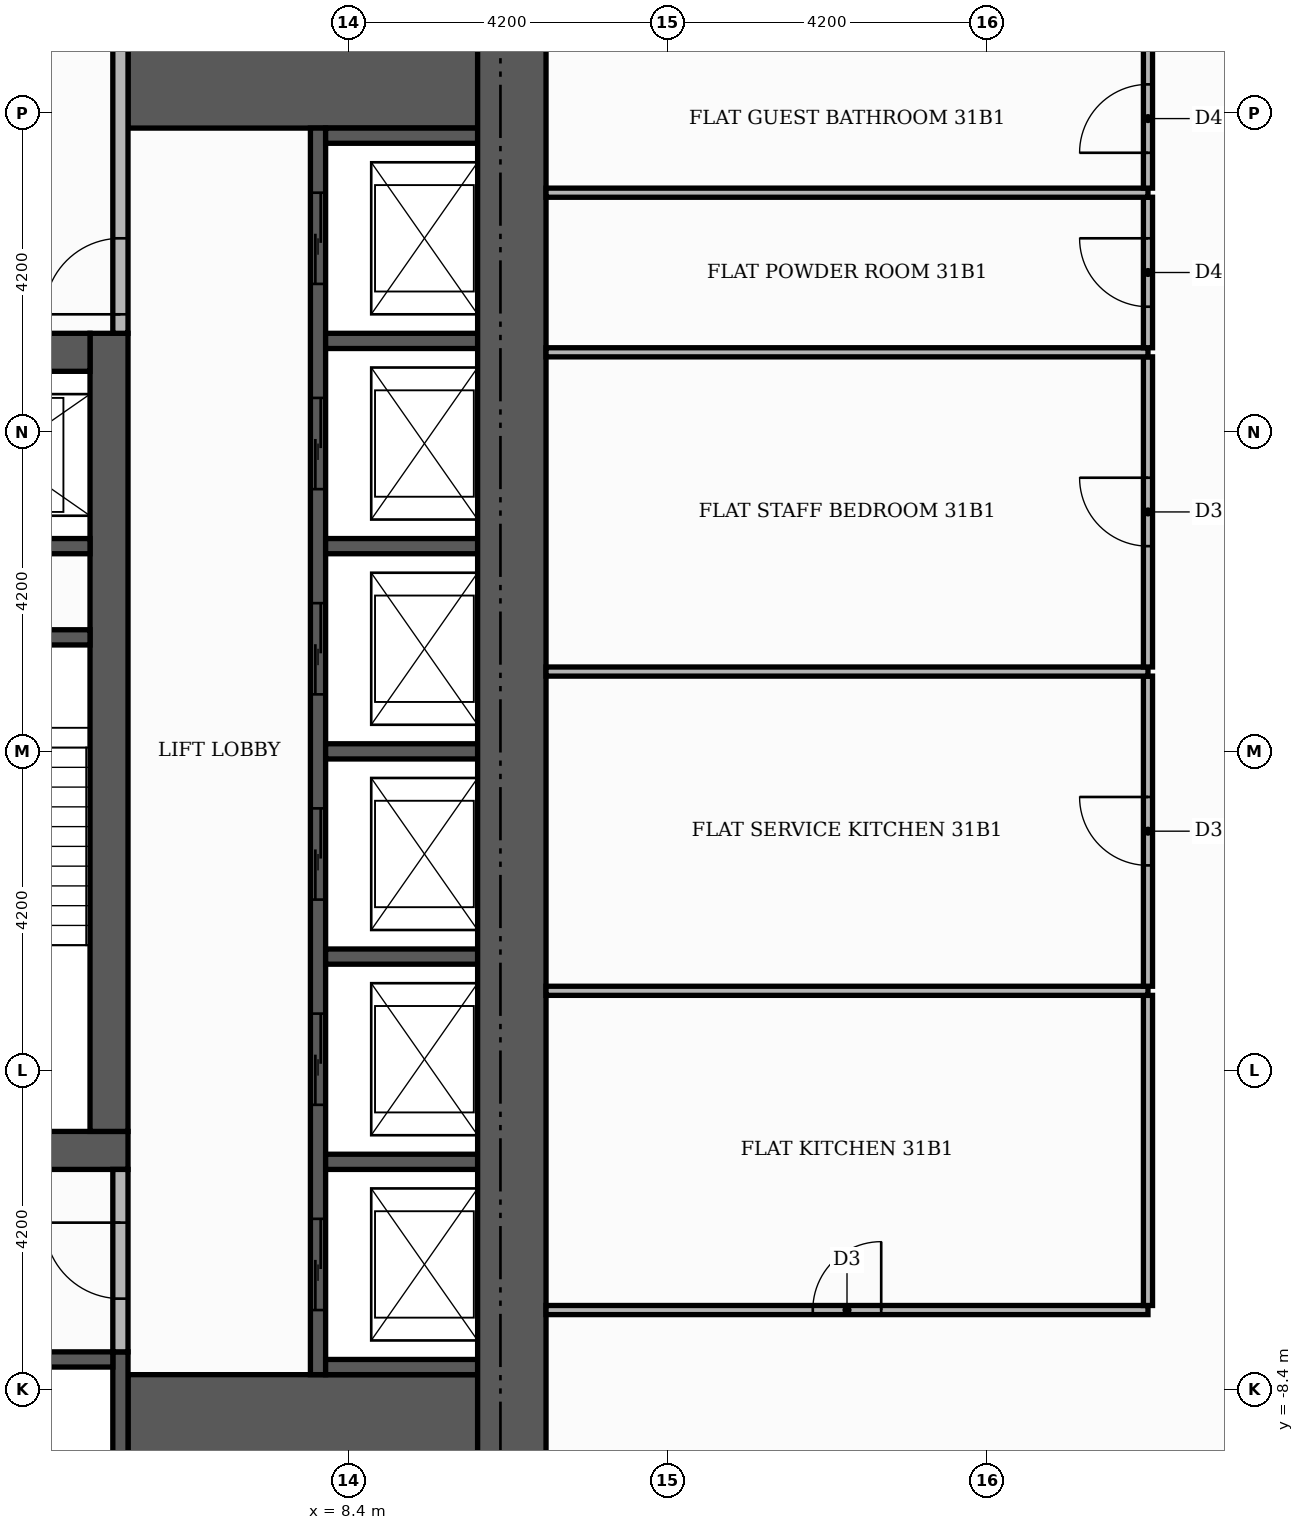
"""IFC4 building model, lengths in metres.
Left out: names, types, materials, properties, quantities, classifications, styles, units other than length and angle.
Written with IfcOpenShell. Run it as: python <this file> out.ifc"""

import sys

from ifc_helpers import new_model, si_unit, direction, frame, frame_2d, origin, place, context, subcontext, project, spatial, rectangle, extrude, element, fill, save


model = new_model("IFC4")
c1 = context("Model", 3, precision=1e-05, world=origin(), true_north=direction((0.0, 1.0)))
c2 = subcontext(c1, "Body", "Model", "MODEL_VIEW")
j1 = project(units=[si_unit("LENGTHUNIT", "METRE"), si_unit("PLANEANGLEUNIT", "RADIAN")], contexts=[c1])
p1 = place(None, origin())
s1 = spatial("IfcSite", under=j1, at=p1, CompositionType="ELEMENT")
p2 = place(p1, origin())
s2 = spatial("IfcBuilding", under=s1, at=p2, CompositionType="ELEMENT")
p3 = place(p2, frame((0.0, 0.0, 133.8)))
s3 = spatial("IfcBuildingStorey", under=s2, at=p3, CompositionType="ELEMENT", Elevation=133.8)
p4 = place(p3, frame((-5.5, -5.25, 0.0), z_axis=(0.0, 0.0, 1.0), x_axis=(1.0, 0.0, 0.0)))
e1 = element("IfcWall", 1, at=p4, inside=s3, PredefinedType="SHEAR", context=c2, shape_type="SweptSolid", body=[
    extrude(rectangle(XDim=11.0, YDim=0.5, at=frame_2d((5.5, 0.0))), origin(), (0.0, 0.0, 1.0), 3.48),
])
p5 = place(p4, frame((4.9, 0.0, 0.0)))
e2 = element("IfcOpeningElement", 2, at=p5, cuts=e1, PredefinedType="OPENING", context=c2, shape_type="SweptSolid", body=[
    extrude(rectangle(XDim=1.2, YDim=2.1, at=frame_2d((0.6, 1.05))), frame((0.0, 0.26, 0.0), z_axis=(0.0, -1.0, 0.0), x_axis=(1.0, 0.0, 0.0)), (0.0, 0.0, 1.0), 0.52),
])
p6 = place(p3, frame((5.25, -5.0, 0.0), z_axis=(0.0, 0.0, 1.0), x_axis=(0.0, 1.0, 0.0)))
e3 = element("IfcWall", 3, at=p6, inside=s3, PredefinedType="SHEAR", context=c2, shape_type="SweptSolid", body=[
    extrude(rectangle(XDim=10.5, YDim=0.5, at=frame_2d((5.25, 0.0))), origin(), (0.0, 0.0, 1.0), 3.48),
])
p7 = place(p3, frame((-5.0, 5.25, 0.0), z_axis=(0.0, 0.0, 1.0), x_axis=(1.0, 0.0, 0.0)))
e4 = element("IfcWall", 4, at=p7, inside=s3, PredefinedType="SHEAR", context=c2, shape_type="SweptSolid", body=[
    extrude(rectangle(XDim=10.0, YDim=0.5, at=frame_2d((5.0, 0.0))), origin(), (0.0, 0.0, 1.0), 3.48),
])
p8 = place(p7, frame((4.4, 0.0, 0.0)))
e5 = element("IfcOpeningElement", 5, at=p8, cuts=e4, PredefinedType="OPENING", context=c2, shape_type="SweptSolid", body=[
    extrude(rectangle(XDim=1.2, YDim=2.1, at=frame_2d((0.6, 1.05))), frame((0.0, 0.26, 0.0), z_axis=(0.0, -1.0, 0.0), x_axis=(1.0, 0.0, 0.0)), (0.0, 0.0, 1.0), 0.52),
])
for number, where, z_axis, x_axis in (
    (6, (5.5, -9.15, 0.0), (0.0, 0.0, 1.0), (1.0, 0.0, 0.0)),
    (7, (5.5, 9.15, 0.0), (0.0, 0.0, 1.0), (1.0, 0.0, 0.0)),
):
    element("IfcWall", number, at=place(p3, frame(where, z_axis=z_axis, x_axis=x_axis)), inside=s3, PredefinedType="SHEAR", context=c2, shape_type="SweptSolid", body=[
        extrude(rectangle(XDim=4.6, YDim=1.9, at=frame_2d((2.3, 0.0))), origin(), (0.0, 0.0, 1.0), 3.48),
    ])
p9 = place(p3, frame((2.15, 1.5, 0.0), z_axis=(0.0, 0.0, 1.0), x_axis=(1.0, 0.0, 0.0)))
e8 = element("IfcWall", 8, at=p9, inside=s3, PredefinedType="SHEAR", context=c2, shape_type="SweptSolid", body=[
    extrude(rectangle(XDim=2.85, YDim=0.2, at=frame_2d((1.425, 0.0))), origin(), (0.0, 0.0, 1.0), 3.48),
])
p10 = place(p3, frame((5.4, -10.1, 0.0), z_axis=(0.0, 0.0, 1.0), x_axis=(0.0, 1.0, 0.0)))
e9 = element("IfcWall", 9, at=p10, inside=s3, PredefinedType="SHEAR", context=c2, shape_type="SweptSolid", body=[
    extrude(rectangle(XDim=2.2, YDim=0.2, at=frame_2d((1.1, 0.0))), origin(), (0.0, 0.0, 1.0), 3.48),
])
p11 = place(p3, frame((8.0, -8.2, 0.0), z_axis=(0.0, 0.0, 1.0), x_axis=(0.0, 1.0, 0.0)))
e10 = element("IfcWall", 10, at=p11, inside=s3, PredefinedType="SHEAR", context=c2, shape_type="SweptSolid", body=[
    extrude(rectangle(XDim=16.4, YDim=0.2, at=frame_2d((8.2, 0.0))), origin(), (0.0, 0.0, 1.0), 3.48),
])
p12 = place(p11, frame((0.85, 0.0, 0.0)))
e11 = element("IfcOpeningElement", 11, at=p12, cuts=e10, PredefinedType="OPENING", context=c2, shape_type="SweptSolid", body=[
    extrude(rectangle(XDim=1.2, YDim=2.1, at=frame_2d((0.6, 1.05))), frame((0.0, 0.11, 0.0), z_axis=(0.0, -1.0, 0.0), x_axis=(1.0, 0.0, 0.0)), (0.0, 0.0, 1.0), 0.22),
])
p13 = place(p11, frame((3.55, 0.0, 0.0)))
e12 = element("IfcOpeningElement", 12, at=p13, cuts=e10, PredefinedType="OPENING", context=c2, shape_type="SweptSolid", body=[
    extrude(rectangle(XDim=1.2, YDim=2.1, at=frame_2d((0.6, 1.05))), frame((0.0, 0.11, 0.0), z_axis=(0.0, -1.0, 0.0), x_axis=(1.0, 0.0, 0.0)), (0.0, 0.0, 1.0), 0.22),
])
p14 = place(p11, frame((6.25, 0.0, 0.0)))
e13 = element("IfcOpeningElement", 13, at=p14, cuts=e10, PredefinedType="OPENING", context=c2, shape_type="SweptSolid", body=[
    extrude(rectangle(XDim=1.2, YDim=2.1, at=frame_2d((0.6, 1.05))), frame((0.0, 0.11, 0.0), z_axis=(0.0, -1.0, 0.0), x_axis=(1.0, 0.0, 0.0)), (0.0, 0.0, 1.0), 0.22),
])
p15 = place(p11, frame((8.95, 0.0, 0.0)))
e14 = element("IfcOpeningElement", 14, at=p15, cuts=e10, PredefinedType="OPENING", context=c2, shape_type="SweptSolid", body=[
    extrude(rectangle(XDim=1.2, YDim=2.1, at=frame_2d((0.6, 1.05))), frame((0.0, 0.11, 0.0), z_axis=(0.0, -1.0, 0.0), x_axis=(1.0, 0.0, 0.0)), (0.0, 0.0, 1.0), 0.22),
])
p16 = place(p11, frame((11.65, 0.0, 0.0)))
e15 = element("IfcOpeningElement", 15, at=p16, cuts=e10, PredefinedType="OPENING", context=c2, shape_type="SweptSolid", body=[
    extrude(rectangle(XDim=1.2, YDim=2.1, at=frame_2d((0.6, 1.05))), frame((0.0, 0.11, 0.0), z_axis=(0.0, -1.0, 0.0), x_axis=(1.0, 0.0, 0.0)), (0.0, 0.0, 1.0), 0.22),
])
p17 = place(p11, frame((14.35, 0.0, 0.0)))
e16 = element("IfcOpeningElement", 16, at=p17, cuts=e10, PredefinedType="OPENING", context=c2, shape_type="SweptSolid", body=[
    extrude(rectangle(XDim=1.2, YDim=2.1, at=frame_2d((0.6, 1.05))), frame((0.0, 0.11, 0.0), z_axis=(0.0, -1.0, 0.0), x_axis=(1.0, 0.0, 0.0)), (0.0, 0.0, 1.0), 0.22),
])
p18 = place(p3, frame((8.1, -8.1, 0.0), z_axis=(0.0, 0.0, 1.0), x_axis=(1.0, 0.0, 0.0)))
e17 = element("IfcWall", 17, at=p18, inside=s3, PredefinedType="SHEAR", context=c2, shape_type="SweptSolid", body=[
    extrude(rectangle(XDim=2.0, YDim=0.2, at=frame_2d((1.0, 0.0))), origin(), (0.0, 0.0, 1.0), 3.48),
])
p19 = place(p3, frame((2.8, -8.0, 0.0), z_axis=(0.0, 0.0, 1.0), x_axis=(1.0, 0.0, 0.0)))
e18 = element("IfcWall", 18, at=p19, inside=s3, PredefinedType="SHEAR", context=c2, shape_type="SweptSolid", body=[
    extrude(rectangle(XDim=2.5, YDim=0.2, at=frame_2d((1.25, 0.0))), origin(), (0.0, 0.0, 1.0), 3.48),
])
for number, where, z_axis, x_axis in (
    (19, (8.1, -5.4, 0.0), (0.0, 0.0, 1.0), (1.0, 0.0, 0.0)),
    (20, (8.1, -2.7, 0.0), (0.0, 0.0, 1.0), (1.0, 0.0, 0.0)),
    (21, (8.1, 0.0, 0.0), (0.0, 0.0, 1.0), (1.0, 0.0, 0.0)),
):
    element("IfcWall", number, at=place(p3, frame(where, z_axis=z_axis, x_axis=x_axis)), inside=s3, PredefinedType="SHEAR", context=c2, shape_type="SweptSolid", body=[
        extrude(rectangle(XDim=2.0, YDim=0.2, at=frame_2d((1.0, 0.0))), origin(), (0.0, 0.0, 1.0), 3.48),
    ])
p20 = place(p3, frame((2.15, 2.7, 0.0), z_axis=(0.0, 0.0, 1.0), x_axis=(1.0, 0.0, 0.0)))
e22 = element("IfcWall", 22, at=p20, inside=s3, PredefinedType="SHEAR", context=c2, shape_type="SweptSolid", body=[
    extrude(rectangle(XDim=2.85, YDim=0.2, at=frame_2d((1.425, 0.0))), origin(), (0.0, 0.0, 1.0), 3.48),
])
for number, where, z_axis, x_axis in (
    (23, (8.1, 2.7, 0.0), (0.0, 0.0, 1.0), (1.0, 0.0, 0.0)),
    (24, (8.1, 5.4, 0.0), (0.0, 0.0, 1.0), (1.0, 0.0, 0.0)),
    (25, (8.1, 8.1, 0.0), (0.0, 0.0, 1.0), (1.0, 0.0, 0.0)),
):
    element("IfcWall", number, at=place(p3, frame(where, z_axis=z_axis, x_axis=x_axis)), inside=s3, PredefinedType="SHEAR", context=c2, shape_type="SweptSolid", body=[
        extrude(rectangle(XDim=2.0, YDim=0.2, at=frame_2d((1.0, 0.0))), origin(), (0.0, 0.0, 1.0), 3.48),
    ])
p21 = place(p3, frame((10.55, -10.1, 0.0), z_axis=(0.0, 0.0, 1.0), x_axis=(0.0, 1.0, 0.0)))
e26 = element("IfcWall", 26, at=p21, inside=s3, PredefinedType="SHEAR", context=c2, shape_type="SweptSolid", body=[
    extrude(rectangle(XDim=20.2, YDim=0.9, at=frame_2d((10.1, 0.0))), origin(), (0.0, 0.0, 1.0), 3.48),
])
p22 = place(p3, frame((5.4, -7.9, 0.0), z_axis=(0.0, 0.0, 1.0), x_axis=(0.0, 1.0, 0.0)))
e27 = element("IfcWall", 27, at=p22, inside=s3, PredefinedType="PARTITIONING", context=c2, shape_type="SweptSolid", body=[
    extrude(rectangle(XDim=2.4, YDim=0.2, at=frame_2d((1.2, 0.0))), origin(), (0.0, 0.0, 1.0), 3.48),
])
p23 = place(p22, frame((0.7, 0.0, 0.0)))
e28 = element("IfcOpeningElement", 28, at=p23, cuts=e27, PredefinedType="OPENING", context=c2, shape_type="SweptSolid", body=[
    extrude(rectangle(XDim=1.0, YDim=2.1, at=frame_2d((0.5, 1.05))), frame((0.0, 0.11, 0.0), z_axis=(0.0, -1.0, 0.0), x_axis=(1.0, 0.0, 0.0)), (0.0, 0.0, 1.0), 0.22),
])
p24 = place(p3, frame((5.4, 5.5, 0.0), z_axis=(0.0, 0.0, 1.0), x_axis=(0.0, 1.0, 0.0)))
e29 = element("IfcWall", 29, at=p24, inside=s3, PredefinedType="PARTITIONING", context=c2, shape_type="SweptSolid", body=[
    extrude(rectangle(XDim=4.6, YDim=0.2, at=frame_2d((2.3, 0.0))), origin(), (0.0, 0.0, 1.0), 3.48),
])
p25 = place(p24, frame((0.25, 0.0, 0.0)))
e30 = element("IfcOpeningElement", 30, at=p25, cuts=e29, PredefinedType="OPENING", context=c2, shape_type="SweptSolid", body=[
    extrude(rectangle(XDim=1.0, YDim=2.1, at=frame_2d((0.5, 1.05))), frame((0.0, 0.11, 0.0), z_axis=(0.0, -1.0, 0.0), x_axis=(1.0, 0.0, 0.0)), (0.0, 0.0, 1.0), 0.22),
])
p26 = place(p3, frame((11.0, -7.35, 0.0), z_axis=(0.0, 0.0, 1.0), x_axis=(1.0, 0.0, 0.0)))
e31 = element("IfcWall", 31, at=p26, inside=s3, PredefinedType="PARTITIONING", context=c2, shape_type="SweptSolid", body=[
    extrude(rectangle(XDim=7.92, YDim=0.12, at=frame_2d((3.96, 0.0))), origin(), (0.0, 0.0, 1.0), 3.48),
])
p27 = place(p26, frame((3.51, 0.0, 0.0)))
e32 = element("IfcOpeningElement", 32, at=p27, cuts=e31, PredefinedType="OPENING", context=c2, shape_type="SweptSolid", body=[
    extrude(rectangle(XDim=0.9, YDim=2.1, at=frame_2d((0.45, 1.05))), frame((0.0, 0.07, 0.0), z_axis=(0.0, -1.0, 0.0), x_axis=(1.0, 0.0, 0.0)), (0.0, 0.0, 1.0), 0.14),
])
p28 = place(p3, frame((18.92, -7.29, 0.0), z_axis=(0.0, 0.0, 1.0), x_axis=(0.0, 1.0, 0.0)))
e33 = element("IfcWall", 33, at=p28, inside=s3, PredefinedType="PARTITIONING", context=c2, shape_type="SweptSolid", body=[
    extrude(rectangle(XDim=4.08, YDim=0.12, at=frame_2d((2.04, 0.0))), origin(), (0.0, 0.0, 1.0), 3.48),
])
p29 = place(p3, frame((11.0, -3.15, 0.0), z_axis=(0.0, 0.0, 1.0), x_axis=(1.0, 0.0, 0.0)))
e34 = element("IfcWall", 34, at=p29, inside=s3, PredefinedType="PARTITIONING", context=c2, shape_type="SweptSolid", body=[
    extrude(rectangle(XDim=7.92, YDim=0.12, at=frame_2d((3.96, 0.0))), origin(), (0.0, 0.0, 1.0), 3.48),
])
p30 = place(p3, frame((18.92, -3.09, 0.0), z_axis=(0.0, 0.0, 1.0), x_axis=(0.0, 1.0, 0.0)))
e35 = element("IfcWall", 35, at=p30, inside=s3, PredefinedType="PARTITIONING", context=c2, shape_type="SweptSolid", body=[
    extrude(rectangle(XDim=4.08, YDim=0.12, at=frame_2d((2.04, 0.0))), origin(), (0.0, 0.0, 1.0), 3.48),
])
p31 = place(p30, frame((1.59, 0.0, 0.0)))
e36 = element("IfcOpeningElement", 36, at=p31, cuts=e35, PredefinedType="OPENING", context=c2, shape_type="SweptSolid", body=[
    extrude(rectangle(XDim=0.9, YDim=2.1, at=frame_2d((0.45, 1.05))), frame((0.0, 0.07, 0.0), z_axis=(0.0, -1.0, 0.0), x_axis=(1.0, 0.0, 0.0)), (0.0, 0.0, 1.0), 0.14),
])
p32 = place(p3, frame((11.0, 1.05, 0.0), z_axis=(0.0, 0.0, 1.0), x_axis=(1.0, 0.0, 0.0)))
e37 = element("IfcWall", 37, at=p32, inside=s3, PredefinedType="PARTITIONING", context=c2, shape_type="SweptSolid", body=[
    extrude(rectangle(XDim=7.92, YDim=0.12, at=frame_2d((3.96, 0.0))), origin(), (0.0, 0.0, 1.0), 3.48),
])
p33 = place(p3, frame((18.92, 1.11, 0.0), z_axis=(0.0, 0.0, 1.0), x_axis=(0.0, 1.0, 0.0)))
e38 = element("IfcWall", 38, at=p33, inside=s3, PredefinedType="PARTITIONING", context=c2, shape_type="SweptSolid", body=[
    extrude(rectangle(XDim=4.08, YDim=0.12, at=frame_2d((2.04, 0.0))), origin(), (0.0, 0.0, 1.0), 3.48),
])
p34 = place(p33, frame((1.59, 0.0, 0.0)))
e39 = element("IfcOpeningElement", 39, at=p34, cuts=e38, PredefinedType="OPENING", context=c2, shape_type="SweptSolid", body=[
    extrude(rectangle(XDim=0.9, YDim=2.1, at=frame_2d((0.45, 1.05))), frame((0.0, 0.07, 0.0), z_axis=(0.0, -1.0, 0.0), x_axis=(1.0, 0.0, 0.0)), (0.0, 0.0, 1.0), 0.14),
])
p35 = place(p3, frame((11.0, 5.25, 0.0), z_axis=(0.0, 0.0, 1.0), x_axis=(1.0, 0.0, 0.0)))
e40 = element("IfcWall", 40, at=p35, inside=s3, PredefinedType="PARTITIONING", context=c2, shape_type="SweptSolid", body=[
    extrude(rectangle(XDim=7.92, YDim=0.12, at=frame_2d((3.96, 0.0))), origin(), (0.0, 0.0, 1.0), 3.48),
])
p36 = place(p3, frame((18.92, 5.31, 0.0), z_axis=(0.0, 0.0, 1.0), x_axis=(0.0, 1.0, 0.0)))
e41 = element("IfcWall", 41, at=p36, inside=s3, PredefinedType="PARTITIONING", context=c2, shape_type="SweptSolid", body=[
    extrude(rectangle(XDim=1.98, YDim=0.12, at=frame_2d((0.99, 0.0))), origin(), (0.0, 0.0, 1.0), 3.48),
])
p37 = place(p36, frame((0.54, 0.0, 0.0)))
e42 = element("IfcOpeningElement", 42, at=p37, cuts=e41, PredefinedType="OPENING", context=c2, shape_type="SweptSolid", body=[
    extrude(rectangle(XDim=0.9, YDim=2.1, at=frame_2d((0.45, 1.05))), frame((0.0, 0.07, 0.0), z_axis=(0.0, -1.0, 0.0), x_axis=(1.0, 0.0, 0.0)), (0.0, 0.0, 1.0), 0.14),
])
p38 = place(p3, frame((11.0, 7.35, 0.0), z_axis=(0.0, 0.0, 1.0), x_axis=(1.0, 0.0, 0.0)))
e43 = element("IfcWall", 43, at=p38, inside=s3, PredefinedType="PARTITIONING", context=c2, shape_type="SweptSolid", body=[
    extrude(rectangle(XDim=7.92, YDim=0.12, at=frame_2d((3.96, 0.0))), origin(), (0.0, 0.0, 1.0), 3.48),
])
p39 = place(p3, frame((18.92, 7.41, 0.0), z_axis=(0.0, 0.0, 1.0), x_axis=(0.0, 1.0, 0.0)))
e44 = element("IfcWall", 44, at=p39, inside=s3, PredefinedType="PARTITIONING", context=c2, shape_type="SweptSolid", body=[
    extrude(rectangle(XDim=1.83, YDim=0.12, at=frame_2d((0.915, 0.0))), origin(), (0.0, 0.0, 1.0), 3.48),
])
p40 = place(p39, frame((0.465, 0.0, 0.0)))
e45 = element("IfcOpeningElement", 45, at=p40, cuts=e44, PredefinedType="OPENING", context=c2, shape_type="SweptSolid", body=[
    extrude(rectangle(XDim=0.9, YDim=2.1, at=frame_2d((0.45, 1.05))), frame((0.0, 0.07, 0.0), z_axis=(0.0, -1.0, 0.0), x_axis=(1.0, 0.0, 0.0)), (0.0, 0.0, 1.0), 0.14),
])
p41 = place(p12, origin())
e46 = element("IfcDoor", 46, at=p41, inside=s3, OperationType="SLIDING_TO_LEFT", PredefinedType="DOOR", context=c2, shape_type="SweptSolid", body=[
    extrude(rectangle(XDim=1.2, YDim=2.1, at=frame_2d((0.6, 1.05))), frame((0.0, 0.025, 0.0), z_axis=(0.0, -1.0, 0.0), x_axis=(1.0, 0.0, 0.0)), (0.0, 0.0, 1.0), 0.05),
])
fill(e11, e46)
p42 = place(p13, origin())
e47 = element("IfcDoor", 47, at=p42, inside=s3, OperationType="SLIDING_TO_LEFT", PredefinedType="DOOR", context=c2, shape_type="SweptSolid", body=[
    extrude(rectangle(XDim=1.2, YDim=2.1, at=frame_2d((0.6, 1.05))), frame((0.0, 0.025, 0.0), z_axis=(0.0, -1.0, 0.0), x_axis=(1.0, 0.0, 0.0)), (0.0, 0.0, 1.0), 0.05),
])
fill(e12, e47)
p43 = place(p14, origin())
e48 = element("IfcDoor", 48, at=p43, inside=s3, OperationType="SLIDING_TO_LEFT", PredefinedType="DOOR", context=c2, shape_type="SweptSolid", body=[
    extrude(rectangle(XDim=1.2, YDim=2.1, at=frame_2d((0.6, 1.05))), frame((0.0, 0.025, 0.0), z_axis=(0.0, -1.0, 0.0), x_axis=(1.0, 0.0, 0.0)), (0.0, 0.0, 1.0), 0.05),
])
fill(e13, e48)
p44 = place(p15, origin())
e49 = element("IfcDoor", 49, at=p44, inside=s3, OperationType="SLIDING_TO_LEFT", PredefinedType="DOOR", context=c2, shape_type="SweptSolid", body=[
    extrude(rectangle(XDim=1.2, YDim=2.1, at=frame_2d((0.6, 1.05))), frame((0.0, 0.025, 0.0), z_axis=(0.0, -1.0, 0.0), x_axis=(1.0, 0.0, 0.0)), (0.0, 0.0, 1.0), 0.05),
])
fill(e14, e49)
p45 = place(p16, origin())
e50 = element("IfcDoor", 50, at=p45, inside=s3, OperationType="SLIDING_TO_LEFT", PredefinedType="DOOR", context=c2, shape_type="SweptSolid", body=[
    extrude(rectangle(XDim=1.2, YDim=2.1, at=frame_2d((0.6, 1.05))), frame((0.0, 0.025, 0.0), z_axis=(0.0, -1.0, 0.0), x_axis=(1.0, 0.0, 0.0)), (0.0, 0.0, 1.0), 0.05),
])
fill(e15, e50)
p46 = place(p17, origin())
e51 = element("IfcDoor", 51, at=p46, inside=s3, OperationType="SLIDING_TO_LEFT", PredefinedType="DOOR", context=c2, shape_type="SweptSolid", body=[
    extrude(rectangle(XDim=1.2, YDim=2.1, at=frame_2d((0.6, 1.05))), frame((0.0, 0.025, 0.0), z_axis=(0.0, -1.0, 0.0), x_axis=(1.0, 0.0, 0.0)), (0.0, 0.0, 1.0), 0.05),
])
fill(e16, e51)
p47 = place(p25, origin())
e52 = element("IfcDoor", 52, at=p47, inside=s3, OperationType="SINGLE_SWING_LEFT", PredefinedType="DOOR", context=c2, shape_type="SweptSolid", body=[
    extrude(rectangle(XDim=1.0, YDim=2.1, at=frame_2d((0.5, 1.05))), frame((0.0, 0.025, 0.0), z_axis=(0.0, -1.0, 0.0), x_axis=(1.0, 0.0, 0.0)), (0.0, 0.0, 1.0), 0.05),
])
fill(e30, e52)
p48 = place(p23, origin())
e53 = element("IfcDoor", 53, at=p48, inside=s3, OperationType="SINGLE_SWING_RIGHT", PredefinedType="DOOR", context=c2, shape_type="SweptSolid", body=[
    extrude(rectangle(XDim=1.0, YDim=2.1, at=frame_2d((0.5, 1.05))), frame((0.0, 0.025, 0.0), z_axis=(0.0, -1.0, 0.0), x_axis=(1.0, 0.0, 0.0)), (0.0, 0.0, 1.0), 0.05),
])
fill(e28, e53)
p49 = place(p27, origin())
e54 = element("IfcDoor", 54, at=p49, inside=s3, OperationType="SINGLE_SWING_RIGHT", PredefinedType="DOOR", context=c2, shape_type="SweptSolid", body=[
    extrude(rectangle(XDim=0.9, YDim=2.1, at=frame_2d((0.45, 1.05))), frame((0.0, 0.025, 0.0), z_axis=(0.0, -1.0, 0.0), x_axis=(1.0, 0.0, 0.0)), (0.0, 0.0, 1.0), 0.05),
])
fill(e32, e54)
p50 = place(p31, origin())
e55 = element("IfcDoor", 55, at=p50, inside=s3, OperationType="SINGLE_SWING_RIGHT", PredefinedType="DOOR", context=c2, shape_type="SweptSolid", body=[
    extrude(rectangle(XDim=0.9, YDim=2.1, at=frame_2d((0.45, 1.05))), frame((0.0, 0.025, 0.0), z_axis=(0.0, -1.0, 0.0), x_axis=(1.0, 0.0, 0.0)), (0.0, 0.0, 1.0), 0.05),
])
fill(e36, e55)
p51 = place(p34, origin())
e56 = element("IfcDoor", 56, at=p51, inside=s3, OperationType="SINGLE_SWING_RIGHT", PredefinedType="DOOR", context=c2, shape_type="SweptSolid", body=[
    extrude(rectangle(XDim=0.9, YDim=2.1, at=frame_2d((0.45, 1.05))), frame((0.0, 0.025, 0.0), z_axis=(0.0, -1.0, 0.0), x_axis=(1.0, 0.0, 0.0)), (0.0, 0.0, 1.0), 0.05),
])
fill(e39, e56)
p52 = place(p37, origin())
e57 = element("IfcDoor", 57, at=p52, inside=s3, OperationType="SINGLE_SWING_RIGHT", PredefinedType="DOOR", context=c2, shape_type="SweptSolid", body=[
    extrude(rectangle(XDim=0.9, YDim=2.1, at=frame_2d((0.45, 1.05))), frame((0.0, 0.025, 0.0), z_axis=(0.0, -1.0, 0.0), x_axis=(1.0, 0.0, 0.0)), (0.0, 0.0, 1.0), 0.05),
])
fill(e42, e57)
p53 = place(p40, origin())
e58 = element("IfcDoor", 58, at=p53, inside=s3, OperationType="SINGLE_SWING_LEFT", PredefinedType="DOOR", context=c2, shape_type="SweptSolid", body=[
    extrude(rectangle(XDim=0.9, YDim=2.1, at=frame_2d((0.45, 1.05))), frame((0.0, 0.025, 0.0), z_axis=(0.0, -1.0, 0.0), x_axis=(1.0, 0.0, 0.0)), (0.0, 0.0, 1.0), 0.05),
])
fill(e45, e58)
save(model, sys.argv[1])
